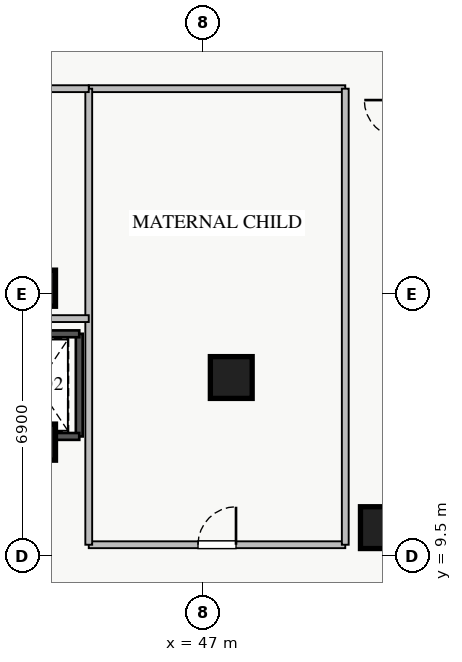
"""IFC4 building model, lengths in metres.
Left out: names, types, materials, properties, quantities, classifications, styles, units other than length and angle.
Written with IfcOpenShell. Run it as: python <this file> out.ifc"""

import sys

from ifc_helpers import new_model, si_unit, direction, frame, frame_2d, origin, origin_2d, place, context, subcontext, project, spatial, rectangle, extrude, source, transform, mapped, element, fill, save


model = new_model("IFC4")
c1 = context("Model", 3, precision=1e-05, world=origin(), true_north=direction((0.0, 1.0)))
c2 = subcontext(c1, "Body", "Model", "MODEL_VIEW")
j1 = project(units=[si_unit("LENGTHUNIT", "METRE"), si_unit("PLANEANGLEUNIT", "RADIAN")], contexts=[c1])
p1 = place(None, origin())
s1 = spatial("IfcSite", under=j1, at=p1, CompositionType="ELEMENT")
p2 = place(p1, origin())
s2 = spatial("IfcBuilding", under=s1, at=p2, CompositionType="ELEMENT")
p3 = place(p2, frame((0.0, 0.0, 9.4)))
s3 = spatial("IfcBuildingStorey", under=s2, at=p3, CompositionType="ELEMENT", Elevation=9.4)
p4 = place(p3, frame((43.75, 12.65, 0.0), z_axis=(0.0, 0.0, 1.0), x_axis=(0.0, 1.0, 0.0)))
e1 = element("IfcWall", 1, at=p4, inside=s3, PredefinedType="SHEAR", context=c2, shape_type="SweptSolid", body=[
    extrude(rectangle(XDim=2.7, YDim=0.18, at=frame_2d((1.35, 0.0))), origin(), (0.0, 0.0, 1.0), 4.18),
])
for number, where, z_axis, x_axis in (
    (2, (41.55, 12.65, 0.0), (0.0, 0.0, 1.0), (1.0, 0.0, 0.0)),
    (3, (41.55, 15.35, 0.0), (0.0, 0.0, 1.0), (1.0, 0.0, 0.0)),
):
    element("IfcWall", number, at=place(p3, frame(where, z_axis=z_axis, x_axis=x_axis)), inside=s3, PredefinedType="SHEAR", context=c2, shape_type="SweptSolid", body=[
        extrude(rectangle(XDim=2.2, YDim=0.18, at=frame_2d((1.1, 0.0))), origin(), (0.0, 0.0, 1.0), 4.18),
    ])
m1 = source(origin(), c2, "Body", "SweptSolid", [
    extrude(rectangle(XDim=1.1, YDim=1.1, at=origin_2d()), origin(), (0.0, 0.0, 1.0), 4.4),
])
for number, where, z_axis, x_axis in (
    (4, (51.7, 10.25, 0.0), (0.0, 0.0, 1.0), (1.0, 0.0, 0.0)),
    (5, (47.75, 14.2, 0.0), (0.0, 0.0, 1.0), (1.0, 0.0, 0.0)),
):
    element("IfcColumn", number, at=place(p3, frame(where, z_axis=z_axis, x_axis=x_axis)), inside=s3, PredefinedType="COLUMN", context=c2, shape_type="MappedRepresentation", body=[
        mapped(m1, transform((0.0, 0.0, 0.0), x_axis=(1.0, 0.0, 0.0), y_axis=(0.0, 1.0, 0.0), z_axis=(0.0, 0.0, 1.0), scale=1.0)),
    ])
m2 = source(origin(), c2, "Body", "SweptSolid", [
    extrude(rectangle(XDim=0.95, YDim=0.95, at=origin_2d()), origin(), (0.0, 0.0, 1.0), 4.4),
])
for number, where, z_axis, x_axis in (
    (6, (42.65, 12.5, 0.0), (0.0, 0.0, 1.0), (1.0, 0.0, 0.0)),
    (7, (42.65, 16.55, 0.0), (0.0, 0.0, 1.0), (1.0, 0.0, 0.0)),
):
    element("IfcColumn", number, at=place(p3, frame(where, z_axis=z_axis, x_axis=x_axis)), inside=s3, PredefinedType="COLUMN", context=c2, shape_type="MappedRepresentation", body=[
        mapped(m2, transform((0.0, 0.0, 0.0), x_axis=(1.0, 0.0, 0.0), y_axis=(0.0, 1.0, 0.0), z_axis=(0.0, 0.0, 1.0), scale=1.0)),
    ])
p5 = place(p3, frame((44.0, 9.8, 0.0), z_axis=(0.0, 0.0, 1.0), x_axis=(1.0, 0.0, 0.0)))
e8 = element("IfcWall", 8, at=p5, inside=s3, PredefinedType="PARTITIONING", context=c2, shape_type="SweptSolid", body=[
    extrude(rectangle(XDim=6.75, YDim=0.18, at=frame_2d((3.375, 0.0))), origin(), (0.0, 0.0, 1.0), 4.18),
])
p6 = place(p5, frame((2.875, 0.0, 0.0)))
e9 = element("IfcOpeningElement", 9, at=p6, cuts=e8, PredefinedType="OPENING", context=c2, shape_type="SweptSolid", body=[
    extrude(rectangle(XDim=1.0, YDim=2.05, at=frame_2d((0.5, 1.025))), frame((0.0, 0.1, 0.0), z_axis=(0.0, -1.0, 0.0), x_axis=(1.0, 0.0, 0.0)), (0.0, 0.0, 1.0), 0.2),
])
p7 = place(p3, frame((44.0, 21.8, 0.0), z_axis=(0.0, 0.0, 1.0), x_axis=(1.0, 0.0, 0.0)))
e10 = element("IfcWall", 10, at=p7, inside=s3, PredefinedType="PARTITIONING", context=c2, shape_type="SweptSolid", body=[
    extrude(rectangle(XDim=6.75, YDim=0.18, at=frame_2d((3.375, 0.0))), origin(), (0.0, 0.0, 1.0), 4.18),
])
for number, where, z_axis, x_axis in (
    (11, (44.0, 9.8, 0.0), (0.0, 0.0, 1.0), (0.0, 1.0, 0.0)),
    (12, (50.75, 9.8, 0.0), (0.0, 0.0, 1.0), (0.0, 1.0, 0.0)),
):
    element("IfcWall", number, at=place(p3, frame(where, z_axis=z_axis, x_axis=x_axis)), inside=s3, PredefinedType="PARTITIONING", context=c2, shape_type="SweptSolid", body=[
        extrude(rectangle(XDim=12.0, YDim=0.18, at=frame_2d((6.0, 0.0))), origin(), (0.0, 0.0, 1.0), 4.18),
    ])
for number, where, z_axis, x_axis in (
    (13, (41.55, 15.75, 0.0), (0.0, 0.0, 1.0), (1.0, 0.0, 0.0)),
    (14, (41.55, 21.8, 0.0), (0.0, 0.0, 1.0), (1.0, 0.0, 0.0)),
):
    element("IfcWall", number, at=place(p3, frame(where, z_axis=z_axis, x_axis=x_axis)), inside=s3, PredefinedType="PARTITIONING", context=c2, shape_type="SweptSolid", body=[
        extrude(rectangle(XDim=2.45, YDim=0.18, at=frame_2d((1.225, 0.0))), origin(), (0.0, 0.0, 1.0), 4.18),
    ])
m3 = source(origin(), c2, "Body", "SweptSolid", [
    extrude(rectangle(XDim=1.0, YDim=2.05, at=frame_2d((0.5, 1.025))), frame((0.0, 0.025, 0.0), z_axis=(0.0, -1.0, 0.0), x_axis=(1.0, 0.0, 0.0)), (0.0, 0.0, 1.0), 0.05),
])
p8 = place(p6, origin())
e15 = element("IfcDoor", 15, at=p8, inside=s3, OperationType="SINGLE_SWING_RIGHT", PredefinedType="DOOR", context=c2, shape_type="MappedRepresentation", body=[
    mapped(m3, transform((0.0, 0.0, 0.0), x_axis=(1.0, 0.0, 0.0), y_axis=(0.0, 1.0, 0.0), z_axis=(0.0, 0.0, 1.0), scale=1.0)),
])
fill(e9, e15)
save(model, sys.argv[1])
